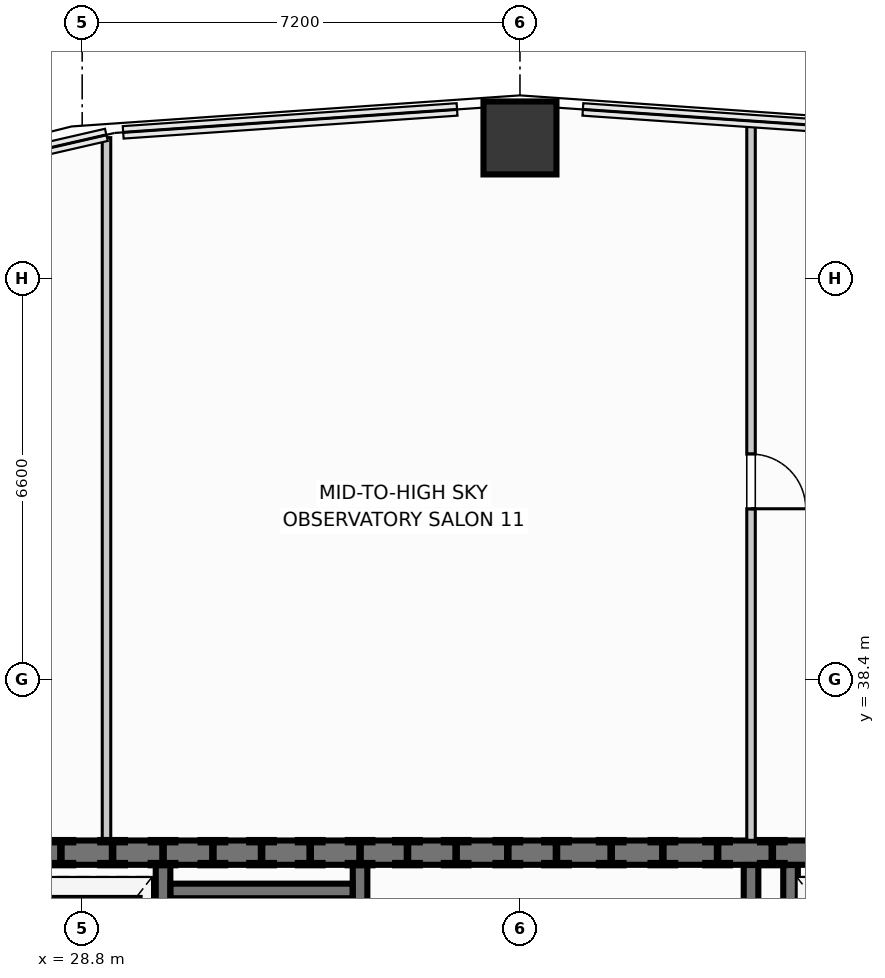
"""IFC4 building model, lengths in metres.
Left out: names, types, materials, properties, quantities, classifications, styles, units other than length and angle.
Written with IfcOpenShell. Run it as: python <this file> out.ifc"""

import sys

from ifc_helpers import new_model, si_unit, direction, frame, frame_2d, origin, origin_2d, place, context, subcontext, project, spatial, rectangle, i_section, extrude, element, fill, save


model = new_model("IFC4")
c1 = context("Model", 3, precision=1e-05, world=origin(), true_north=direction((0.0, 1.0)))
c2 = subcontext(c1, "Body", "Model", "MODEL_VIEW")
j1 = project(units=[si_unit("LENGTHUNIT", "METRE"), si_unit("PLANEANGLEUNIT", "RADIAN")], contexts=[c1])
p1 = place(None, origin())
s1 = spatial("IfcSite", under=j1, at=p1, CompositionType="ELEMENT")
p2 = place(p1, origin())
s2 = spatial("IfcBuilding", under=s1, at=p2, CompositionType="ELEMENT")
p3 = place(p2, frame((0.0, 0.0, 200.35)))
s3 = spatial("IfcBuildingStorey", under=s2, at=p3, CompositionType="ELEMENT", Elevation=200.35)
for number, where, z_axis, x_axis in (
    (1, (28.45, 35.55, 0.0), (0.0, 0.0, 1.0), (1.0, 0.0, 0.0)),
    (2, (30.13, 35.55, 0.0), (0.0, 0.0, 1.0), (1.0, 0.0, 0.0)),
    (3, (31.75, 35.55, 0.0), (0.0, 0.0, 1.0), (1.0, 0.0, 0.0)),
    (4, (33.37, 35.55, 0.0), (0.0, 0.0, 1.0), (1.0, 0.0, 0.0)),
    (5, (34.95, 35.55, 0.0), (0.0, 0.0, 1.0), (1.0, 0.0, 0.0)),
    (6, (36.6, 35.55, 0.0), (0.0, 0.0, 1.0), (1.0, 0.0, 0.0)),
    (7, (38.35, 35.55, 0.0), (0.0, 0.0, 1.0), (1.0, 0.0, 0.0)),
    (8, (40.15, 35.55, 0.0), (0.0, 0.0, 1.0), (1.0, 0.0, 0.0)),
    (9, (32.55, 35.55, 0.0), (0.0, 0.0, 1.0), (1.0, 0.0, 0.0)),
    (10, (37.5, 35.55, 0.0), (0.0, 0.0, 1.0), (1.0, 0.0, 0.0)),
    (11, (29.3, 35.55, 0.0), (0.0, 0.0, 1.0), (1.0, 0.0, 0.0)),
    (12, (30.95, 35.55, 0.0), (0.0, 0.0, 1.0), (1.0, 0.0, 0.0)),
    (13, (34.15, 35.55, 0.0), (0.0, 0.0, 1.0), (1.0, 0.0, 0.0)),
    (14, (35.8, 35.55, 0.0), (0.0, 0.0, 1.0), (1.0, 0.0, 0.0)),
    (15, (39.25, 35.55, 0.0), (0.0, 0.0, 1.0), (1.0, 0.0, 0.0)),
):
    element("IfcColumn", number, at=place(p3, frame(where, z_axis=z_axis, x_axis=x_axis)), inside=s3, PredefinedType="COLUMN", context=c2, shape_type="SweptSolid", body=[
        extrude(i_section(OverallWidth=0.406, OverallDepth=0.416, WebThickness=0.024, FlangeThickness=0.039, at=origin_2d()), origin(), (0.0, 0.0, 1.0), 4.5),
    ])
p4 = place(p3, frame((36.0, 47.305, 0.0), z_axis=(0.0, 0.0, 1.0), x_axis=(0.0, 1.0, 0.0)))
e16 = element("IfcColumn", 16, at=p4, inside=s3, PredefinedType="COLUMN", context=c2, shape_type="SweptSolid", body=[
    extrude(rectangle(XDim=1.2, YDim=1.2, at=origin_2d()), origin(), (0.0, 0.0, 1.0), 4.5),
])
p5 = place(p3, frame((50.35, 35.55, 0.0), z_axis=(0.0, 0.0, 1.0), x_axis=(-1.0, 0.0, 0.0)))
e17 = element("IfcWall", 17, at=p5, inside=s3, PredefinedType="SHEAR", context=c2, shape_type="SweptSolid", body=[
    extrude(rectangle(XDim=28.7, YDim=0.4, at=frame_2d((14.35, 0.0))), origin(), (0.0, 0.0, 1.0), 4.5),
])
for number, where, z_axis, x_axis in (
    (18, (30.13, 26.953, 0.0), (0.0, 0.0, 1.0), (0.0, 1.0, 0.0)),
    (19, (33.37, 26.953, 0.0), (0.0, 0.0, 1.0), (0.0, 1.0, 0.0)),
):
    element("IfcWall", number, at=place(p3, frame(where, z_axis=z_axis, x_axis=x_axis)), inside=s3, PredefinedType="SHEAR", context=c2, shape_type="SweptSolid", body=[
        extrude(rectangle(XDim=8.394, YDim=0.24, at=frame_2d((4.197, 0.0))), origin(), (0.0, 0.0, 1.0), 4.5),
    ])
p6 = place(p3, frame((30.253, 34.92, 0.0), z_axis=(0.0, 0.0, 1.0), x_axis=(1.0, 0.0, 0.0)))
e20 = element("IfcWall", 20, at=p6, inside=s3, PredefinedType="SHEAR", context=c2, shape_type="SweptSolid", body=[
    extrude(rectangle(XDim=2.994, YDim=0.24, at=frame_2d((1.497, 0.0))), origin(), (0.0, 0.0, 1.0), 4.5),
])
for number, where, z_axis, x_axis in (
    (21, (39.8, 32.673, 0.0), (0.0, 0.0, 1.0), (0.0, 1.0, 0.0)),
    (22, (40.45, 32.673, 0.0), (0.0, 0.0, 1.0), (0.0, 1.0, 0.0)),
):
    element("IfcWall", number, at=place(p3, frame(where, z_axis=z_axis, x_axis=x_axis)), inside=s3, PredefinedType="SHEAR", context=c2, shape_type="SweptSolid", body=[
        extrude(rectangle(XDim=2.674, YDim=0.24, at=frame_2d((1.337, 0.0))), origin(), (0.0, 0.0, 1.0), 4.5),
    ])
p7 = place(p3, frame((29.2, 35.753, 0.0), z_axis=(0.0, 0.0, 1.0), x_axis=(0.0, 1.0, 0.0)))
e23 = element("IfcWall", 23, at=p7, inside=s3, PredefinedType="PARTITIONING", context=c2, shape_type="SweptSolid", body=[
    extrude(rectangle(XDim=11.557, YDim=0.14, at=frame_2d((5.779, 0.0))), origin(), (0.0, 0.0, 1.0), 4.245),
])
p8 = place(p3, frame((39.8, 35.753, 0.0), z_axis=(0.0, 0.0, 1.0), x_axis=(0.0, 1.0, 0.0)))
e24 = element("IfcWall", 24, at=p8, inside=s3, PredefinedType="PARTITIONING", context=c2, shape_type="SweptSolid", body=[
    extrude(rectangle(XDim=11.786, YDim=0.14, at=frame_2d((5.893, 0.0))), origin(), (0.0, 0.0, 1.0), 4.245),
])
p9 = place(p8, frame((5.453, 0.0, 0.0)))
e25 = element("IfcOpeningElement", 25, at=p9, cuts=e24, PredefinedType="OPENING", context=c2, shape_type="SweptSolid", body=[
    extrude(rectangle(XDim=0.9, YDim=2.0, at=frame_2d((0.45, 1.0))), frame((0.0, 0.08, 0.0), z_axis=(0.0, -1.0, 0.0), x_axis=(1.0, 0.0, 0.0)), (0.0, 0.0, 1.0), 0.16),
])
p10 = place(p9, frame((0.9, 0.0, 0.0), z_axis=(0.0, 0.0, 1.0), x_axis=(-1.0, 0.0, 0.0)))
e26 = element("IfcDoor", 26, at=p10, inside=s3, OperationType="SINGLE_SWING_RIGHT", PredefinedType="DOOR", context=c2, shape_type="SweptSolid", body=[
    extrude(rectangle(XDim=0.9, YDim=2.0, at=frame_2d((0.45, 1.0))), frame((0.0, 0.025, 0.0), z_axis=(0.0, -1.0, 0.0), x_axis=(1.0, 0.0, 0.0)), (0.0, 0.0, 1.0), 0.05),
])
fill(e25, e26)
save(model, sys.argv[1])
